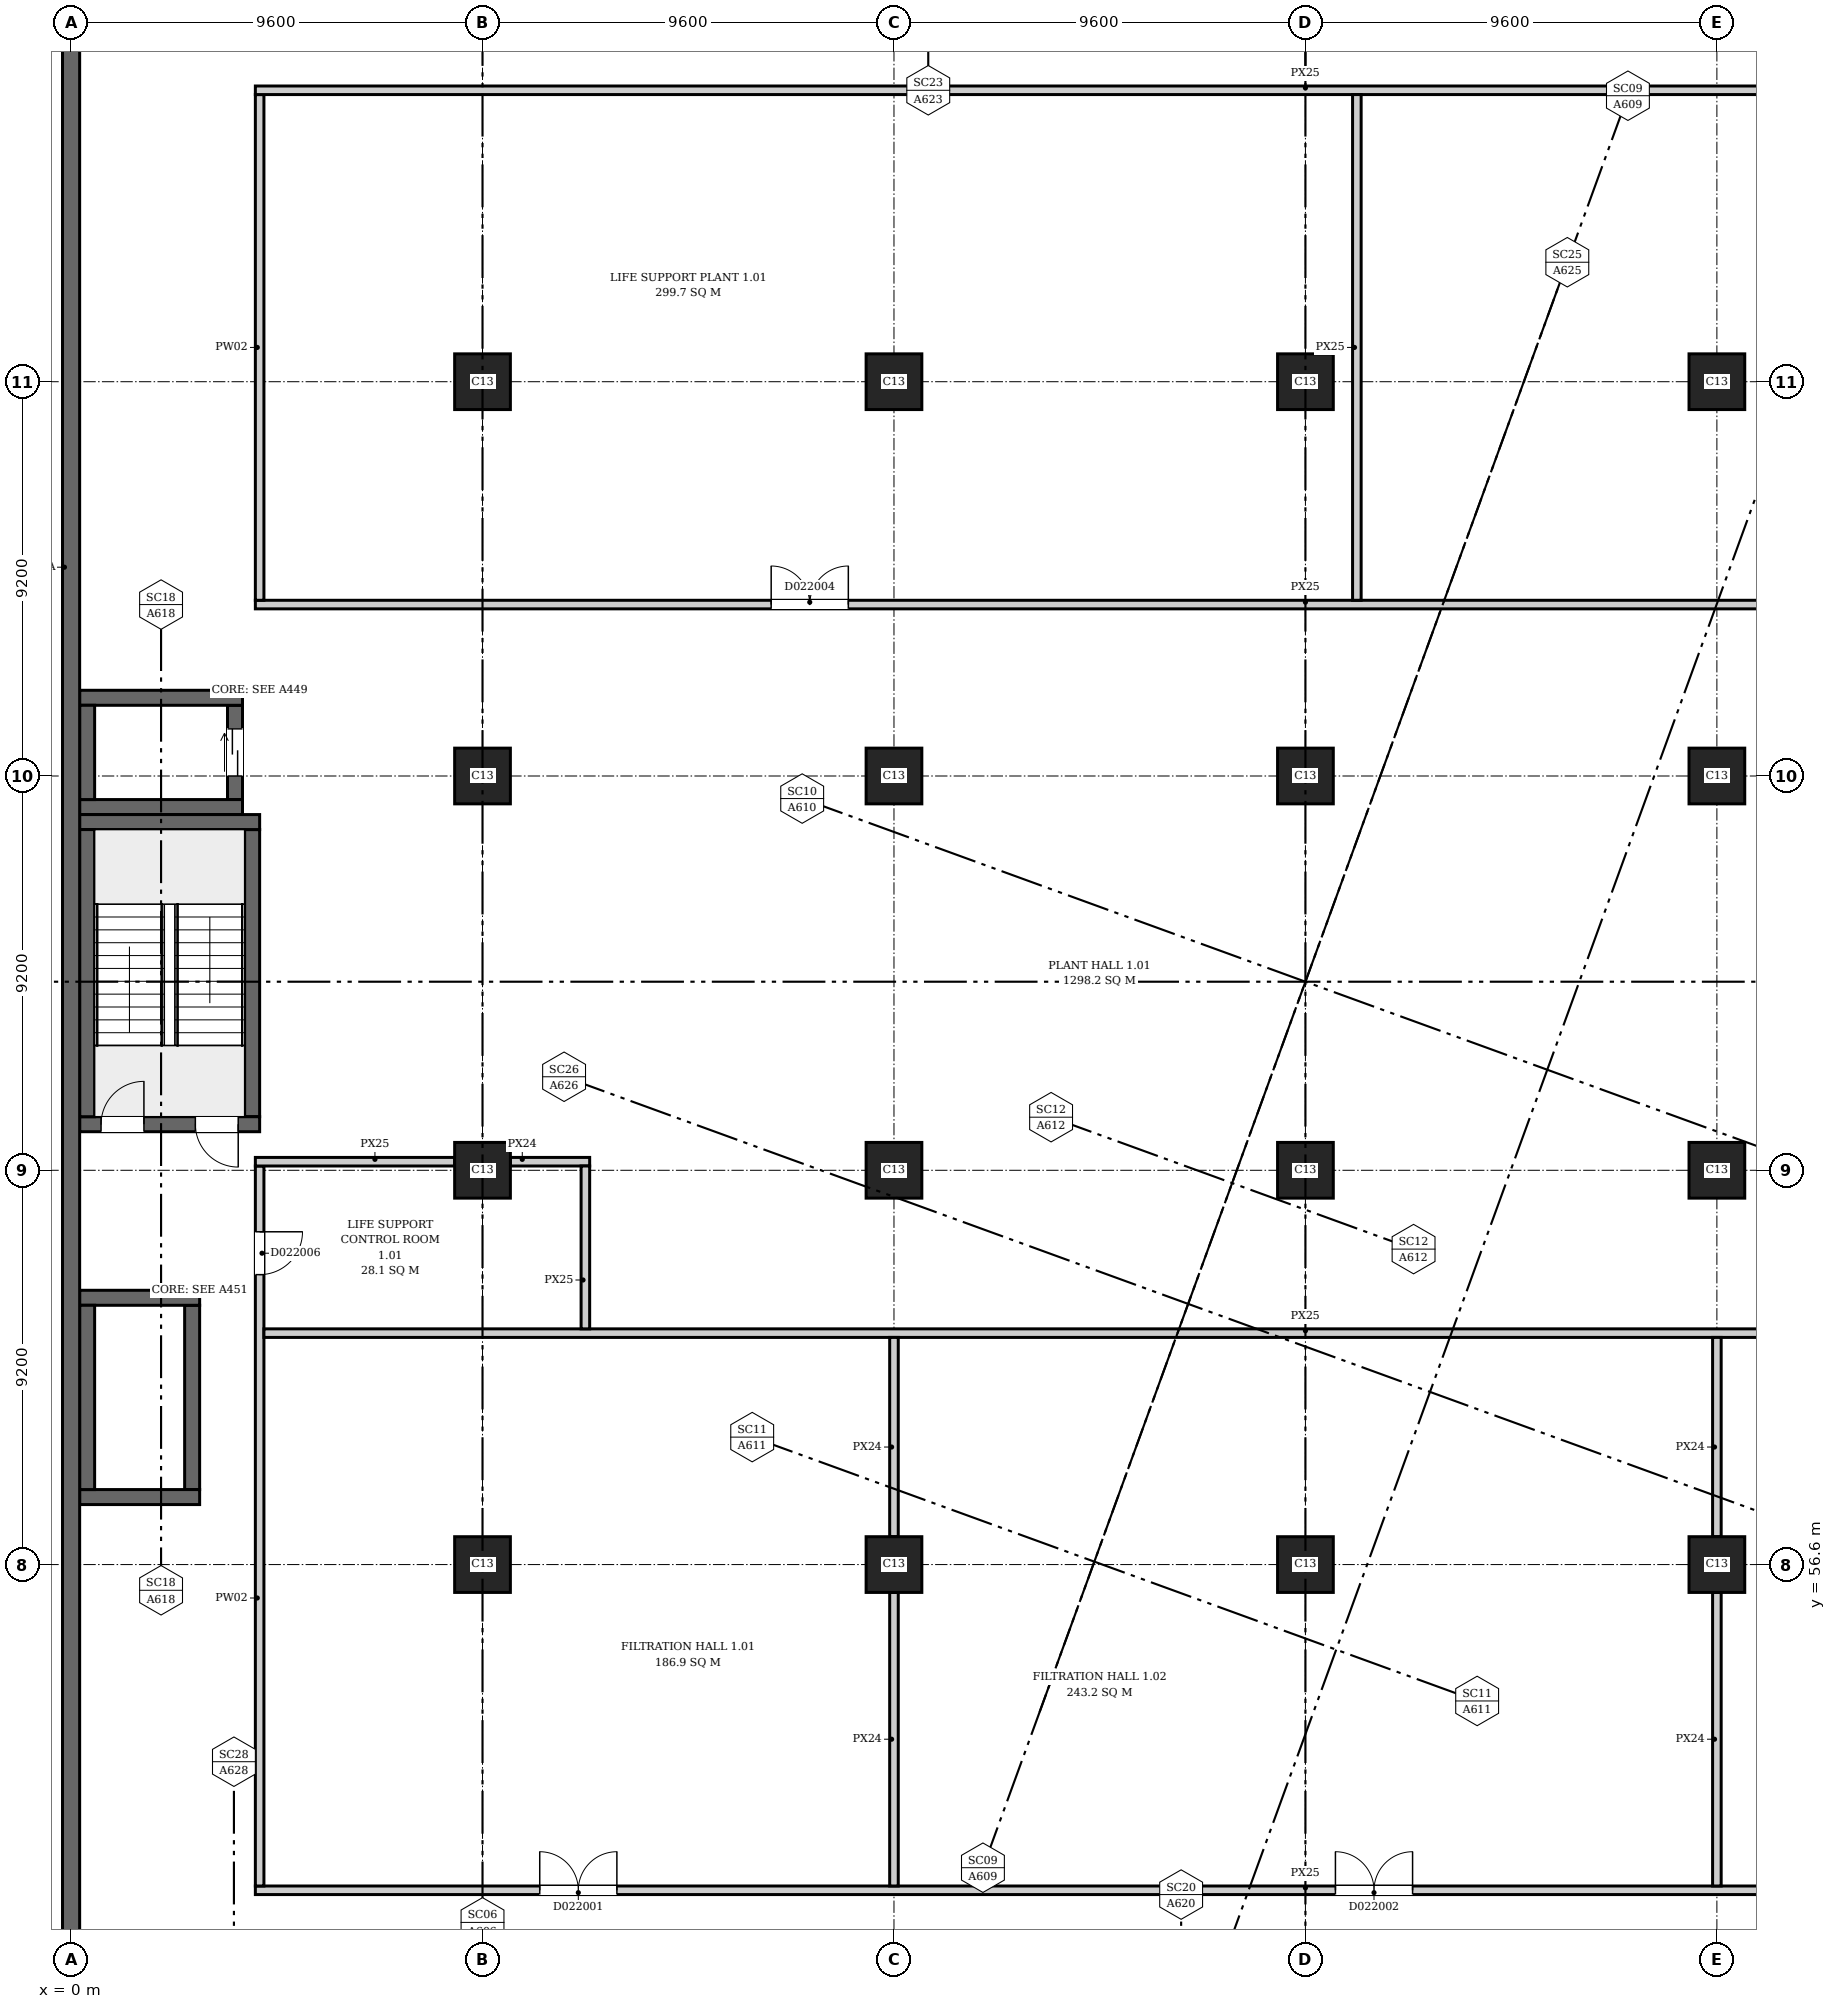
"""IFC4 building model, lengths in metres.
Left out: names, types, materials, properties, quantities, classifications, styles, units other than length and angle.
Written with IfcOpenShell. Run it as: python <this file> out.ifc"""

import sys

from ifc_helpers import new_model, si_unit, direction, frame, frame_2d, origin, origin_2d, place, context, subcontext, project, spatial, rectangle, extrude, element, fill, save


model = new_model("IFC4")
c1 = context("Model", 3, precision=1e-05, world=origin(), true_north=direction((0.0, 1.0)))
c2 = subcontext(c1, "Body", "Model", "MODEL_VIEW")
j1 = project(units=[si_unit("LENGTHUNIT", "METRE"), si_unit("PLANEANGLEUNIT", "RADIAN")], contexts=[c1])
p1 = place(None, origin())
s1 = spatial("IfcSite", under=j1, at=p1, CompositionType="ELEMENT")
p2 = place(p1, origin())
s2 = spatial("IfcBuilding", under=s1, at=p2, CompositionType="ELEMENT")
p3 = place(p2, frame((0.0, 0.0, 6.5)))
s3 = spatial("IfcBuildingStorey", under=s2, at=p3, CompositionType="ELEMENT", Elevation=6.5)
p4 = place(p3, frame((0.0, 46.72, 0.0), z_axis=(0.0, 0.0, 1.0), x_axis=(0.0, 1.0, 0.0)))
e1 = element("IfcWall", 1, at=p4, inside=s3, PredefinedType="SHEAR", context=c2, shape_type="SweptSolid", body=[
    extrude(rectangle(XDim=47.36, YDim=0.4, at=frame_2d((23.68, 0.0))), origin(), (0.0, 0.0, 1.0), 7.7),
])
p5 = place(p3, frame((0.2, 66.875, 0.0), z_axis=(0.0, 0.0, 1.0), x_axis=(1.0, 0.0, 0.0)))
e2 = element("IfcWall", 2, at=p5, inside=s3, PredefinedType="SHEAR", context=c2, shape_type="SweptSolid", body=[
    extrude(rectangle(XDim=4.2, YDim=0.35, at=frame_2d((2.1, 0.0))), origin(), (0.0, 0.0, 1.0), 7.7),
])
p6 = place(p5, frame((0.5, 0.0, 0.0)))
e3 = element("IfcOpeningElement", 3, at=p6, cuts=e2, PredefinedType="OPENING", context=c2, shape_type="SweptSolid", body=[
    extrude(rectangle(XDim=1.0, YDim=2.1, at=frame_2d((0.5, 1.05))), frame((0.0, 0.185, 0.0), z_axis=(0.0, -1.0, 0.0), x_axis=(1.0, 0.0, 0.0)), (0.0, 0.0, 1.0), 0.37),
])
p7 = place(p5, frame((2.7, 0.0, 0.0)))
e4 = element("IfcOpeningElement", 4, at=p7, cuts=e2, PredefinedType="OPENING", context=c2, shape_type="SweptSolid", body=[
    extrude(rectangle(XDim=1.0, YDim=2.1, at=frame_2d((0.5, 1.05))), frame((0.0, 0.185, 0.0), z_axis=(0.0, -1.0, 0.0), x_axis=(1.0, 0.0, 0.0)), (0.0, 0.0, 1.0), 0.37),
])
p8 = place(p3, frame((0.2, 73.925, 0.0), z_axis=(0.0, 0.0, 1.0), x_axis=(1.0, 0.0, 0.0)))
e5 = element("IfcWall", 5, at=p8, inside=s3, PredefinedType="SHEAR", context=c2, shape_type="SweptSolid", body=[
    extrude(rectangle(XDim=4.2, YDim=0.35, at=frame_2d((2.1, 0.0))), origin(), (0.0, 0.0, 1.0), 7.7),
])
for number, where, z_axis, x_axis in (
    (6, (0.375, 67.05, 0.0), (0.0, 0.0, 1.0), (0.0, 1.0, 0.0)),
    (7, (4.225, 67.05, 0.0), (0.0, 0.0, 1.0), (0.0, 1.0, 0.0)),
):
    element("IfcWall", number, at=place(p3, frame(where, z_axis=z_axis, x_axis=x_axis)), inside=s3, PredefinedType="SHEAR", context=c2, shape_type="SweptSolid", body=[
        extrude(rectangle(XDim=6.7, YDim=0.35, at=frame_2d((3.35, 0.0))), origin(), (0.0, 0.0, 1.0), 7.7),
    ])
for number, where, z_axis, x_axis in (
    (8, (0.2, 74.275, 0.0), (0.0, 0.0, 1.0), (1.0, 0.0, 0.0)),
    (9, (0.2, 76.825, 0.0), (0.0, 0.0, 1.0), (1.0, 0.0, 0.0)),
):
    element("IfcWall", number, at=place(p3, frame(where, z_axis=z_axis, x_axis=x_axis)), inside=s3, PredefinedType="SHEAR", context=c2, shape_type="SweptSolid", body=[
        extrude(rectangle(XDim=3.8, YDim=0.35, at=frame_2d((1.9, 0.0))), origin(), (0.0, 0.0, 1.0), 7.7),
    ])
p9 = place(p3, frame((0.375, 74.45, 0.0), z_axis=(0.0, 0.0, 1.0), x_axis=(0.0, 1.0, 0.0)))
e10 = element("IfcWall", 10, at=p9, inside=s3, PredefinedType="SHEAR", context=c2, shape_type="SweptSolid", body=[
    extrude(rectangle(XDim=2.2, YDim=0.35, at=frame_2d((1.1, 0.0))), origin(), (0.0, 0.0, 1.0), 7.7),
])
p10 = place(p3, frame((3.825, 74.45, 0.0), z_axis=(0.0, 0.0, 1.0), x_axis=(0.0, 1.0, 0.0)))
e11 = element("IfcWall", 11, at=p10, inside=s3, PredefinedType="SHEAR", context=c2, shape_type="SweptSolid", body=[
    extrude(rectangle(XDim=2.2, YDim=0.35, at=frame_2d((1.1, 0.0))), origin(), (0.0, 0.0, 1.0), 7.7),
])
p11 = place(p10, frame((0.55, 0.0, 0.0)))
e12 = element("IfcOpeningElement", 12, at=p11, cuts=e11, PredefinedType="OPENING", context=c2, shape_type="SweptSolid", body=[
    extrude(rectangle(XDim=1.1, YDim=2.1, at=frame_2d((0.55, 1.05))), frame((0.0, 0.185, 0.0), z_axis=(0.0, -1.0, 0.0), x_axis=(1.0, 0.0, 0.0)), (0.0, 0.0, 1.0), 0.37),
])
for number, where, z_axis, x_axis in (
    (13, (0.2, 58.175, 0.0), (0.0, 0.0, 1.0), (1.0, 0.0, 0.0)),
    (14, (0.2, 62.825, 0.0), (0.0, 0.0, 1.0), (1.0, 0.0, 0.0)),
):
    element("IfcWall", number, at=place(p3, frame(where, z_axis=z_axis, x_axis=x_axis)), inside=s3, PredefinedType="SHEAR", context=c2, shape_type="SweptSolid", body=[
        extrude(rectangle(XDim=2.8, YDim=0.35, at=frame_2d((1.4, 0.0))), origin(), (0.0, 0.0, 1.0), 7.7),
    ])
for number, where, z_axis, x_axis in (
    (15, (0.375, 58.35, 0.0), (0.0, 0.0, 1.0), (0.0, 1.0, 0.0)),
    (16, (2.825, 58.35, 0.0), (0.0, 0.0, 1.0), (0.0, 1.0, 0.0)),
):
    element("IfcWall", number, at=place(p3, frame(where, z_axis=z_axis, x_axis=x_axis)), inside=s3, PredefinedType="SHEAR", context=c2, shape_type="SweptSolid", body=[
        extrude(rectangle(XDim=4.3, YDim=0.35, at=frame_2d((2.15, 0.0))), origin(), (0.0, 0.0, 1.0), 7.7),
    ])
for number, where, z_axis, x_axis in (
    (17, (9.6, 56.6, 0.0), (0.0, 0.0, 1.0), (1.0, 0.0, 0.0)),
    (18, (19.2, 56.6, 0.0), (0.0, 0.0, 1.0), (1.0, 0.0, 0.0)),
    (19, (28.8, 56.6, 0.0), (0.0, 0.0, 1.0), (1.0, 0.0, 0.0)),
    (20, (38.4, 56.6, 0.0), (0.0, 0.0, 1.0), (1.0, 0.0, 0.0)),
    (21, (9.6, 65.8, 0.0), (0.0, 0.0, 1.0), (1.0, 0.0, 0.0)),
    (22, (19.2, 65.8, 0.0), (0.0, 0.0, 1.0), (1.0, 0.0, 0.0)),
    (23, (28.8, 65.8, 0.0), (0.0, 0.0, 1.0), (1.0, 0.0, 0.0)),
    (24, (38.4, 65.8, 0.0), (0.0, 0.0, 1.0), (1.0, 0.0, 0.0)),
    (25, (9.6, 75.0, 0.0), (0.0, 0.0, 1.0), (1.0, 0.0, 0.0)),
    (26, (19.2, 75.0, 0.0), (0.0, 0.0, 1.0), (1.0, 0.0, 0.0)),
    (27, (28.8, 75.0, 0.0), (0.0, 0.0, 1.0), (1.0, 0.0, 0.0)),
    (28, (38.4, 75.0, 0.0), (0.0, 0.0, 1.0), (1.0, 0.0, 0.0)),
    (29, (9.6, 84.2, 0.0), (0.0, 0.0, 1.0), (1.0, 0.0, 0.0)),
    (30, (19.2, 84.2, 0.0), (0.0, 0.0, 1.0), (1.0, 0.0, 0.0)),
    (31, (28.8, 84.2, 0.0), (0.0, 0.0, 1.0), (1.0, 0.0, 0.0)),
    (32, (38.4, 84.2, 0.0), (0.0, 0.0, 1.0), (1.0, 0.0, 0.0)),
):
    element("IfcColumn", number, at=place(p3, frame(where, z_axis=z_axis, x_axis=x_axis)), inside=s3, PredefinedType="COLUMN", context=c2, shape_type="SweptSolid", body=[
        extrude(rectangle(XDim=1.3, YDim=1.3, at=origin_2d()), origin(), (0.0, 0.0, 1.0), 7.7),
    ])
p12 = place(p3, frame((4.3, 49.0, 0.0), z_axis=(0.0, 0.0, 1.0), x_axis=(1.0, 0.0, 0.0)))
e33 = element("IfcWall", 33, at=p12, inside=s3, PredefinedType="PARTITIONING", context=c2, shape_type="SweptSolid", body=[
    extrude(rectangle(XDim=49.0, YDim=0.2, at=frame_2d((24.5, 0.0))), origin(), (0.0, 0.0, 1.0), 5.1),
])
p13 = place(p12, frame((6.635, 0.0, 0.0)))
e34 = element("IfcOpeningElement", 34, at=p13, cuts=e33, PredefinedType="OPENING", context=c2, shape_type="SweptSolid", body=[
    extrude(rectangle(XDim=1.8, YDim=2.1, at=frame_2d((0.9, 1.05))), frame((0.0, 0.11, 0.0), z_axis=(0.0, -1.0, 0.0), x_axis=(1.0, 0.0, 0.0)), (0.0, 0.0, 1.0), 0.22),
])
p14 = place(p12, frame((25.2, 0.0, 0.0)))
e35 = element("IfcOpeningElement", 35, at=p14, cuts=e33, PredefinedType="OPENING", context=c2, shape_type="SweptSolid", body=[
    extrude(rectangle(XDim=1.8, YDim=2.1, at=frame_2d((0.9, 1.05))), frame((0.0, 0.11, 0.0), z_axis=(0.0, -1.0, 0.0), x_axis=(1.0, 0.0, 0.0)), (0.0, 0.0, 1.0), 0.22),
])
p15 = place(p12, frame((40.565, 0.0, 0.0)))
e36 = element("IfcOpeningElement", 36, at=p15, cuts=e33, PredefinedType="OPENING", context=c2, shape_type="SweptSolid", body=[
    extrude(rectangle(XDim=1.8, YDim=2.1, at=frame_2d((0.9, 1.05))), frame((0.0, 0.11, 0.0), z_axis=(0.0, -1.0, 0.0), x_axis=(1.0, 0.0, 0.0)), (0.0, 0.0, 1.0), 0.22),
])
p16 = place(p3, frame((4.4, 49.1, 0.0), z_axis=(0.0, 0.0, 1.0), x_axis=(0.0, 1.0, 0.0)))
e37 = element("IfcWall", 37, at=p16, inside=s3, PredefinedType="PARTITIONING", context=c2, shape_type="SweptSolid", body=[
    extrude(rectangle(XDim=16.8, YDim=0.2, at=frame_2d((8.4, 0.0))), origin(), (0.0, 0.0, 1.0), 7.35),
])
p17 = place(p16, frame((14.265, 0.0, 0.0)))
e38 = element("IfcOpeningElement", 38, at=p17, cuts=e37, PredefinedType="OPENING", context=c2, shape_type="SweptSolid", body=[
    extrude(rectangle(XDim=1.0, YDim=2.1, at=frame_2d((0.5, 1.05))), frame((0.0, 0.11, 0.0), z_axis=(0.0, -1.0, 0.0), x_axis=(1.0, 0.0, 0.0)), (0.0, 0.0, 1.0), 0.22),
])
p18 = place(p3, frame((4.3, 66.0, 0.0), z_axis=(0.0, 0.0, 1.0), x_axis=(1.0, 0.0, 0.0)))
e39 = element("IfcWall", 39, at=p18, inside=s3, PredefinedType="PARTITIONING", context=c2, shape_type="SweptSolid", body=[
    extrude(rectangle(XDim=4.65, YDim=0.2, at=frame_2d((2.325, 0.0))), origin(), (0.0, 0.0, 1.0), 5.1),
])
p19 = place(p3, frame((4.3, 79.0, 0.0), z_axis=(0.0, 0.0, 1.0), x_axis=(1.0, 0.0, 0.0)))
e40 = element("IfcWall", 40, at=p19, inside=s3, PredefinedType="PARTITIONING", context=c2, shape_type="SweptSolid", body=[
    extrude(rectangle(XDim=49.0, YDim=0.2, at=frame_2d((24.5, 0.0))), origin(), (0.0, 0.0, 1.0), 5.1),
])
p20 = place(p19, frame((12.035, 0.0, 0.0)))
e41 = element("IfcOpeningElement", 41, at=p20, cuts=e40, PredefinedType="OPENING", context=c2, shape_type="SweptSolid", body=[
    extrude(rectangle(XDim=1.8, YDim=2.1, at=frame_2d((0.9, 1.05))), frame((0.0, 0.11, 0.0), z_axis=(0.0, -1.0, 0.0), x_axis=(1.0, 0.0, 0.0)), (0.0, 0.0, 1.0), 0.22),
])
p21 = place(p19, frame((36.365, 0.0, 0.0)))
e42 = element("IfcOpeningElement", 42, at=p21, cuts=e40, PredefinedType="OPENING", context=c2, shape_type="SweptSolid", body=[
    extrude(rectangle(XDim=1.8, YDim=2.1, at=frame_2d((0.9, 1.05))), frame((0.0, 0.11, 0.0), z_axis=(0.0, -1.0, 0.0), x_axis=(1.0, 0.0, 0.0)), (0.0, 0.0, 1.0), 0.22),
])
p22 = place(p3, frame((4.4, 79.1, 0.0), z_axis=(0.0, 0.0, 1.0), x_axis=(0.0, 1.0, 0.0)))
e43 = element("IfcWall", 43, at=p22, inside=s3, PredefinedType="PARTITIONING", context=c2, shape_type="SweptSolid", body=[
    extrude(rectangle(XDim=11.8, YDim=0.2, at=frame_2d((5.9, 0.0))), origin(), (0.0, 0.0, 1.0), 7.35),
])
p23 = place(p3, frame((4.3, 91.0, 0.0), z_axis=(0.0, 0.0, 1.0), x_axis=(1.0, 0.0, 0.0)))
e44 = element("IfcWall", 44, at=p23, inside=s3, PredefinedType="PARTITIONING", context=c2, shape_type="SweptSolid", body=[
    extrude(rectangle(XDim=49.0, YDim=0.2, at=frame_2d((24.5, 0.0))), origin(), (0.0, 0.0, 1.0), 5.1),
])
p24 = place(p3, frame((4.5, 62.0, 0.0), z_axis=(0.0, 0.0, 1.0), x_axis=(1.0, 0.0, 0.0)))
e45 = element("IfcWall", 45, at=p24, inside=s3, PredefinedType="PARTITIONING", context=c2, shape_type="SweptSolid", body=[
    extrude(rectangle(XDim=48.6, YDim=0.2, at=frame_2d((24.3, 0.0))), origin(), (0.0, 0.0, 1.0), 5.1),
])
p25 = place(p3, frame((10.25, 66.0, 0.0), z_axis=(0.0, 0.0, 1.0), x_axis=(1.0, 0.0, 0.0)))
e46 = element("IfcWall", 46, at=p25, inside=s3, PredefinedType="PARTITIONING", context=c2, shape_type="SweptSolid", body=[
    extrude(rectangle(XDim=1.85, YDim=0.2, at=frame_2d((0.925, 0.0))), origin(), (0.0, 0.0, 1.0), 4.7),
])
p26 = place(p3, frame((12.0, 62.1, 0.0), z_axis=(0.0, 0.0, 1.0), x_axis=(0.0, 1.0, 0.0)))
e47 = element("IfcWall", 47, at=p26, inside=s3, PredefinedType="PARTITIONING", context=c2, shape_type="SweptSolid", body=[
    extrude(rectangle(XDim=3.8, YDim=0.2, at=frame_2d((1.9, 0.0))), origin(), (0.0, 0.0, 1.0), 5.1),
])
p27 = place(p3, frame((19.2, 49.1, 0.0), z_axis=(0.0, 0.0, 1.0), x_axis=(0.0, 1.0, 0.0)))
e48 = element("IfcWall", 48, at=p27, inside=s3, PredefinedType="PARTITIONING", context=c2, shape_type="SweptSolid", body=[
    extrude(rectangle(XDim=6.85, YDim=0.2, at=frame_2d((3.425, 0.0))), origin(), (0.0, 0.0, 1.0), 4.7),
])
p28 = place(p3, frame((19.2, 57.25, 0.0), z_axis=(0.0, 0.0, 1.0), x_axis=(0.0, 1.0, 0.0)))
e49 = element("IfcWall", 49, at=p28, inside=s3, PredefinedType="PARTITIONING", context=c2, shape_type="SweptSolid", body=[
    extrude(rectangle(XDim=4.65, YDim=0.2, at=frame_2d((2.325, 0.0))), origin(), (0.0, 0.0, 1.0), 4.7),
])
p29 = place(p3, frame((30.0, 79.1, 0.0), z_axis=(0.0, 0.0, 1.0), x_axis=(0.0, 1.0, 0.0)))
e50 = element("IfcWall", 50, at=p29, inside=s3, PredefinedType="PARTITIONING", context=c2, shape_type="SweptSolid", body=[
    extrude(rectangle(XDim=11.8, YDim=0.2, at=frame_2d((5.9, 0.0))), origin(), (0.0, 0.0, 1.0), 5.1),
])
p30 = place(p3, frame((38.4, 49.1, 0.0), z_axis=(0.0, 0.0, 1.0), x_axis=(0.0, 1.0, 0.0)))
e51 = element("IfcWall", 51, at=p30, inside=s3, PredefinedType="PARTITIONING", context=c2, shape_type="SweptSolid", body=[
    extrude(rectangle(XDim=6.85, YDim=0.2, at=frame_2d((3.425, 0.0))), origin(), (0.0, 0.0, 1.0), 4.7),
])
p31 = place(p3, frame((38.4, 57.25, 0.0), z_axis=(0.0, 0.0, 1.0), x_axis=(0.0, 1.0, 0.0)))
e52 = element("IfcWall", 52, at=p31, inside=s3, PredefinedType="PARTITIONING", context=c2, shape_type="SweptSolid", body=[
    extrude(rectangle(XDim=4.65, YDim=0.2, at=frame_2d((2.325, 0.0))), origin(), (0.0, 0.0, 1.0), 4.7),
])
p32 = place(p6, origin())
e53 = element("IfcDoor", 53, at=p32, inside=s3, OperationType="SINGLE_SWING_RIGHT", PredefinedType="DOOR", context=c2, shape_type="SweptSolid", body=[
    extrude(rectangle(XDim=1.0, YDim=2.1, at=frame_2d((0.5, 1.05))), frame((0.0, 0.025, 0.0), z_axis=(0.0, -1.0, 0.0), x_axis=(1.0, 0.0, 0.0)), (0.0, 0.0, 1.0), 0.05),
])
fill(e3, e53)
p33 = place(p7, origin())
e54 = element("IfcDoor", 54, at=p33, inside=s3, OperationType="SINGLE_SWING_LEFT", PredefinedType="DOOR", context=c2, shape_type="SweptSolid", body=[
    extrude(rectangle(XDim=1.0, YDim=2.1, at=frame_2d((0.5, 1.05))), frame((0.0, 0.025, 0.0), z_axis=(0.0, -1.0, 0.0), x_axis=(1.0, 0.0, 0.0)), (0.0, 0.0, 1.0), 0.05),
])
fill(e4, e54)
p34 = place(p11, origin())
e55 = element("IfcDoor", 55, at=p34, inside=s3, OperationType="DOUBLE_DOOR_SLIDING", PredefinedType="DOOR", context=c2, shape_type="SweptSolid", body=[
    extrude(rectangle(XDim=1.1, YDim=2.1, at=frame_2d((0.55, 1.05))), frame((0.0, 0.025, 0.0), z_axis=(0.0, -1.0, 0.0), x_axis=(1.0, 0.0, 0.0)), (0.0, 0.0, 1.0), 0.05),
])
fill(e12, e55)
p35 = place(p13, origin())
e56 = element("IfcDoor", 56, at=p35, inside=s3, OperationType="DOUBLE_DOOR_SINGLE_SWING", PredefinedType="DOOR", context=c2, shape_type="SweptSolid", body=[
    extrude(rectangle(XDim=1.8, YDim=2.1, at=frame_2d((0.9, 1.05))), frame((0.0, 0.025, 0.0), z_axis=(0.0, -1.0, 0.0), x_axis=(1.0, 0.0, 0.0)), (0.0, 0.0, 1.0), 0.05),
])
fill(e34, e56)
p36 = place(p14, origin())
e57 = element("IfcDoor", 57, at=p36, inside=s3, OperationType="DOUBLE_DOOR_SINGLE_SWING", PredefinedType="DOOR", context=c2, shape_type="SweptSolid", body=[
    extrude(rectangle(XDim=1.8, YDim=2.1, at=frame_2d((0.9, 1.05))), frame((0.0, 0.025, 0.0), z_axis=(0.0, -1.0, 0.0), x_axis=(1.0, 0.0, 0.0)), (0.0, 0.0, 1.0), 0.05),
])
fill(e35, e57)
p37 = place(p20, origin())
e58 = element("IfcDoor", 58, at=p37, inside=s3, OperationType="DOUBLE_DOOR_SINGLE_SWING", PredefinedType="DOOR", context=c2, shape_type="SweptSolid", body=[
    extrude(rectangle(XDim=1.8, YDim=2.1, at=frame_2d((0.9, 1.05))), frame((0.0, 0.025, 0.0), z_axis=(0.0, -1.0, 0.0), x_axis=(1.0, 0.0, 0.0)), (0.0, 0.0, 1.0), 0.05),
])
fill(e41, e58)
p38 = place(p17, origin())
e59 = element("IfcDoor", 59, at=p38, inside=s3, OperationType="SINGLE_SWING_RIGHT", PredefinedType="DOOR", context=c2, shape_type="SweptSolid", body=[
    extrude(rectangle(XDim=1.0, YDim=2.1, at=frame_2d((0.5, 1.05))), frame((0.0, 0.025, 0.0), z_axis=(0.0, -1.0, 0.0), x_axis=(1.0, 0.0, 0.0)), (0.0, 0.0, 1.0), 0.05),
])
fill(e38, e59)
save(model, sys.argv[1])
